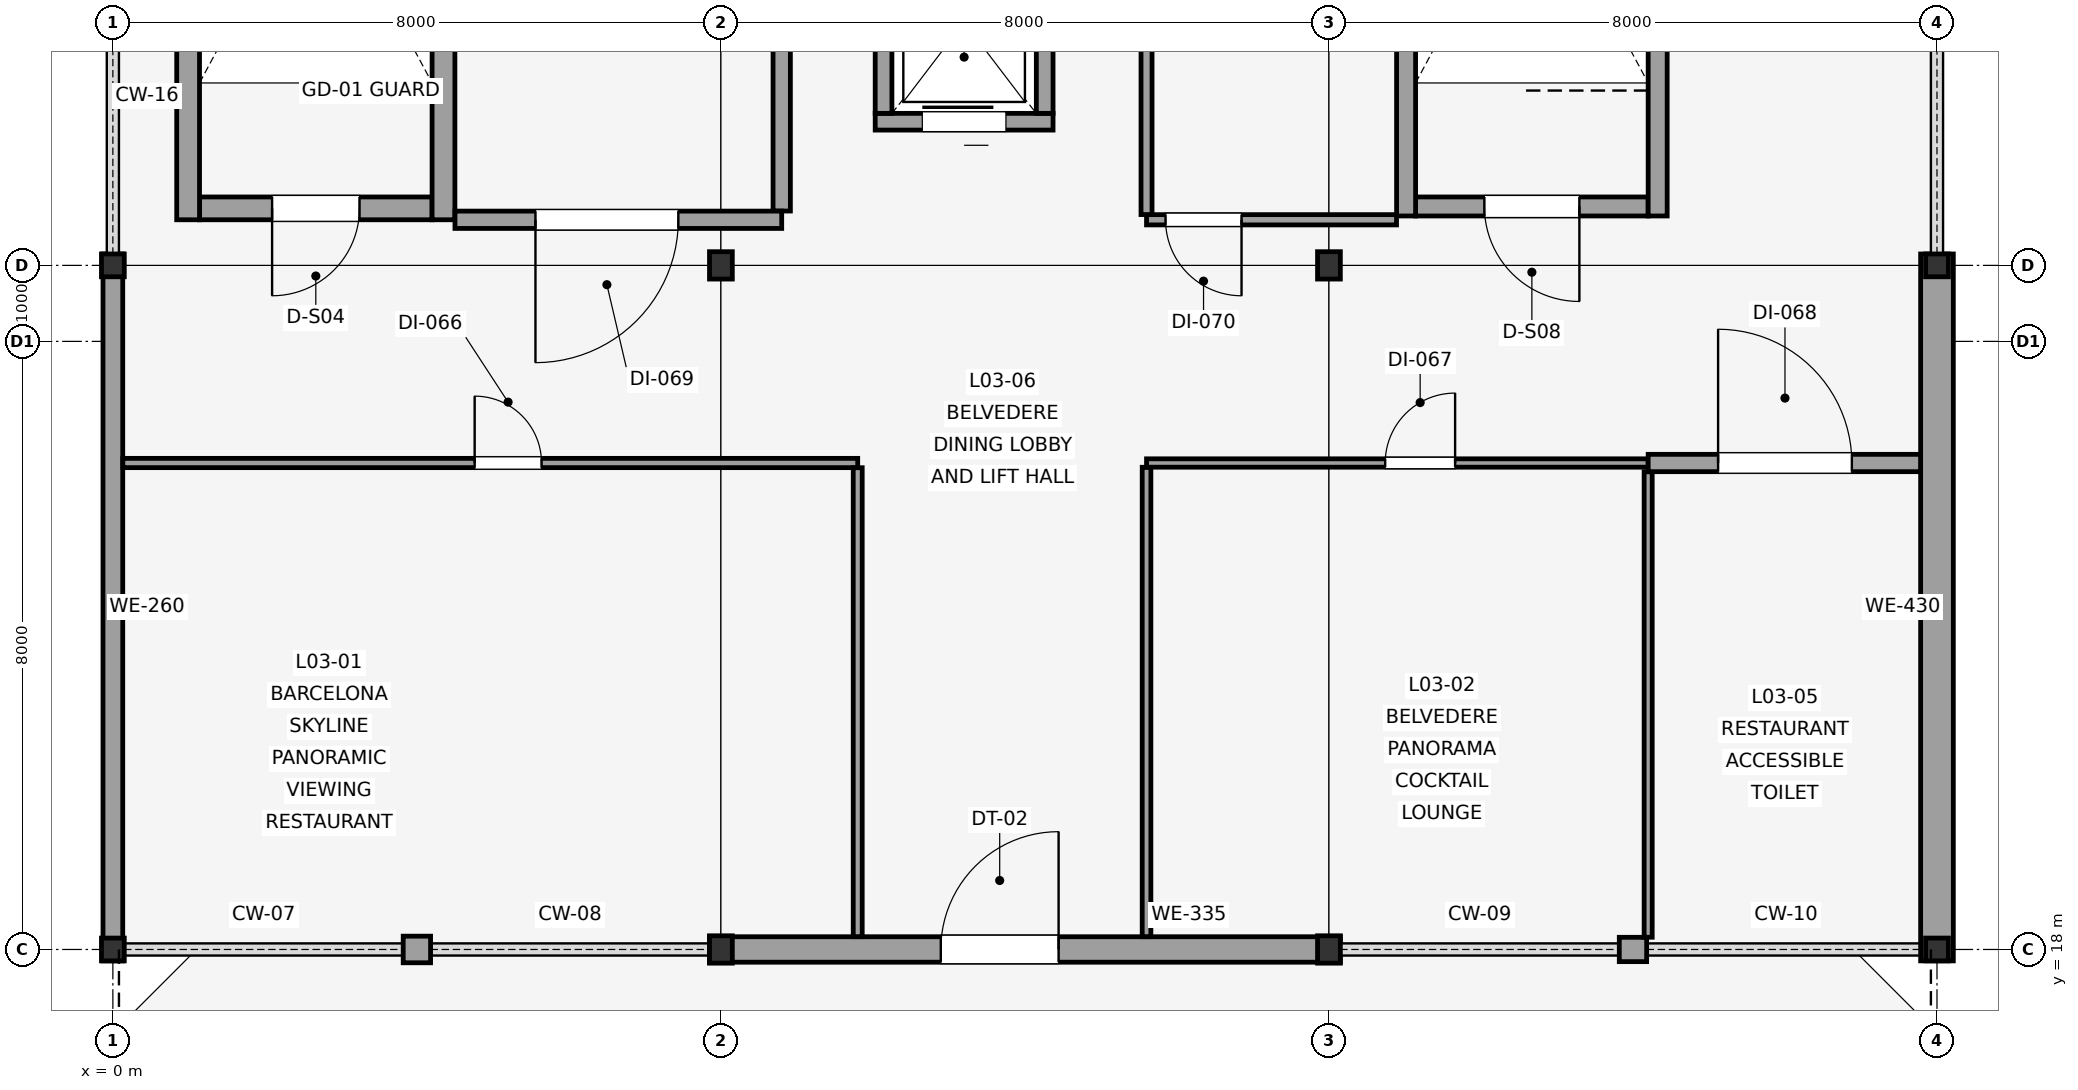
"""IFC4 building model, lengths in metres.
Left out: names, types, materials, properties, quantities, classifications, styles, units other than length and angle.
Written with IfcOpenShell. Run it as: python <this file> out.ifc"""

import sys

from ifc_helpers import new_model, si_unit, direction, frame, frame_2d, origin, origin_2d, place, context, subcontext, project, spatial, rectangle, i_section, extrude, element, fill, save


model = new_model("IFC4")
c1 = context("Model", 3, precision=1e-05, world=origin(), true_north=direction((0.0, 1.0)))
c2 = subcontext(c1, "Body", "Model", "MODEL_VIEW")
j1 = project(units=[si_unit("LENGTHUNIT", "METRE"), si_unit("PLANEANGLEUNIT", "RADIAN")], contexts=[c1])
p1 = place(None, origin())
s1 = spatial("IfcSite", under=j1, at=p1, CompositionType="ELEMENT")
p2 = place(p1, origin())
s2 = spatial("IfcBuilding", under=s1, at=p2, CompositionType="ELEMENT")
p3 = place(p2, frame((0.0, 0.0, 13.8)))
s3 = spatial("IfcBuildingStorey", under=s2, at=p3, CompositionType="ELEMENT", Elevation=13.8)
for number, where, z_axis, x_axis in (
    (1, (0.0, 18.0, 0.0), (0.0, 0.0, 1.0), (1.0, 0.0, 0.0)),
    (2, (0.0, 27.0, 0.0), (0.0, 0.0, 1.0), (1.0, 0.0, 0.0)),
):
    element("IfcColumn", number, at=place(p3, frame(where, z_axis=z_axis, x_axis=x_axis)), inside=s3, PredefinedType="COLUMN", context=c2, shape_type="SweptSolid", body=[
        extrude(i_section(OverallWidth=0.3, OverallDepth=0.3, WebThickness=0.009, FlangeThickness=0.014, FilletRadius=0.027, at=origin_2d()), origin(), (0.0, 0.0, 1.0), 4.5),
    ])
for number, where, z_axis, x_axis in (
    (3, (8.0, 18.0, 0.0), (0.0, 0.0, 1.0), (1.0, 0.0, 0.0)),
    (4, (8.0, 27.0, 0.0), (0.0, 0.0, 1.0), (1.0, 0.0, 0.0)),
    (5, (16.0, 18.0, 0.0), (0.0, 0.0, 1.0), (1.0, 0.0, 0.0)),
    (6, (16.0, 27.0, 0.0), (0.0, 0.0, 1.0), (1.0, 0.0, 0.0)),
):
    element("IfcColumn", number, at=place(p3, frame(where, z_axis=z_axis, x_axis=x_axis)), inside=s3, PredefinedType="COLUMN", context=c2, shape_type="SweptSolid", body=[
        extrude(i_section(OverallWidth=0.3, OverallDepth=0.36, WebThickness=0.01, FlangeThickness=0.018, FilletRadius=0.027, at=origin_2d()), origin(), (0.0, 0.0, 1.0), 4.5),
    ])
for number, where, z_axis, x_axis in (
    (7, (24.0, 18.0, 0.0), (0.0, 0.0, 1.0), (1.0, 0.0, 0.0)),
    (8, (24.0, 27.0, 0.0), (0.0, 0.0, 1.0), (1.0, 0.0, 0.0)),
):
    element("IfcColumn", number, at=place(p3, frame(where, z_axis=z_axis, x_axis=x_axis)), inside=s3, PredefinedType="COLUMN", context=c2, shape_type="SweptSolid", body=[
        extrude(i_section(OverallWidth=0.3, OverallDepth=0.3, WebThickness=0.009, FlangeThickness=0.014, FilletRadius=0.027, at=origin_2d()), origin(), (0.0, 0.0, 1.0), 4.5),
    ])
p4 = place(p3, frame((3.82, 18.0, 0.0), z_axis=(0.0, 0.0, 1.0), x_axis=(1.0, 0.0, 0.0)))
e9 = element("IfcWall", 9, at=p4, inside=s3, PredefinedType="SOLIDWALL", context=c2, shape_type="SweptSolid", body=[
    extrude(rectangle(XDim=0.36, YDim=0.35, at=frame_2d((0.18, 0.0))), origin(), (0.0, 0.0, 1.0), 2.55),
])
p5 = place(p3, frame((7.85, 18.0, 0.0), z_axis=(0.0, 0.0, 1.0), x_axis=(1.0, 0.0, 0.0)))
e10 = element("IfcWall", 10, at=p5, inside=s3, PredefinedType="SOLIDWALL", context=c2, shape_type="SweptSolid", body=[
    extrude(rectangle(XDim=8.3, YDim=0.335, at=frame_2d((4.15, 0.0))), origin(), (0.0, 0.0, 1.0), 2.55),
])
p6 = place(p5, frame((3.043, 0.0, 0.0)))
e11 = element("IfcOpeningElement", 11, at=p6, cuts=e10, PredefinedType="OPENING", context=c2, shape_type="SweptSolid", body=[
    extrude(rectangle(XDim=1.55, YDim=2.3, at=frame_2d((0.775, 1.15))), frame((0.0, 0.177, 0.0), z_axis=(0.0, -1.0, 0.0), x_axis=(1.0, 0.0, 0.0)), (0.0, 0.0, 1.0), 0.355),
])
p7 = place(p3, frame((19.82, 18.0, 0.0), z_axis=(0.0, 0.0, 1.0), x_axis=(1.0, 0.0, 0.0)))
e12 = element("IfcWall", 12, at=p7, inside=s3, PredefinedType="SOLIDWALL", context=c2, shape_type="SweptSolid", body=[
    extrude(rectangle(XDim=0.36, YDim=0.32, at=frame_2d((0.18, 0.0))), origin(), (0.0, 0.0, 1.0), 2.55),
])
p8 = place(p3, frame((0.0, 27.15, 0.0), z_axis=(0.0, 0.0, 1.0), x_axis=(0.0, -1.0, 0.0)))
e13 = element("IfcWall", 13, at=p8, inside=s3, PredefinedType="SOLIDWALL", context=c2, shape_type="SweptSolid", body=[
    extrude(rectangle(XDim=9.3, YDim=0.26, at=frame_2d((4.65, 0.0))), origin(), (0.0, 0.0, 1.0), 2.55),
])
p9 = place(p3, frame((24.0, 17.85, 0.0), z_axis=(0.0, 0.0, 1.0), x_axis=(0.0, 1.0, 0.0)))
e14 = element("IfcWall", 14, at=p9, inside=s3, PredefinedType="SOLIDWALL", context=c2, shape_type="SweptSolid", body=[
    extrude(rectangle(XDim=9.3, YDim=0.43, at=frame_2d((4.65, 0.0))), origin(), (0.0, 0.0, 1.0), 2.55),
])
p10 = place(p3, frame((4.2, 27.75, 0.0), z_axis=(0.0, 0.0, 1.0), x_axis=(-1.0, 0.0, 0.0)))
e15 = element("IfcWall", 15, at=p10, inside=s3, PredefinedType="SHEAR", context=c2, shape_type="SweptSolid", body=[
    extrude(rectangle(XDim=3.06, YDim=0.3, at=frame_2d((1.53, 0.0))), origin(), (0.0, 0.0, 1.0), 4.5),
])
p11 = place(p10, frame((0.955, 0.0, 0.0)))
e16 = element("IfcOpeningElement", 16, at=p11, cuts=e15, PredefinedType="OPENING", context=c2, shape_type="SweptSolid", body=[
    extrude(rectangle(XDim=1.15, YDim=2.15, at=frame_2d((0.575, 1.075))), frame((0.0, 0.16, 0.0), z_axis=(0.0, -1.0, 0.0), x_axis=(1.0, 0.0, 0.0)), (0.0, 0.0, 1.0), 0.32),
])
for number, where, z_axis, x_axis in (
    (17, (4.35, 27.6, 0.0), (0.0, 0.0, 1.0), (0.0, 1.0, 0.0)),
    (18, (0.99, 27.6, 0.0), (0.0, 0.0, 1.0), (0.0, 1.0, 0.0)),
):
    element("IfcWall", number, at=place(p3, frame(where, z_axis=z_axis, x_axis=x_axis)), inside=s3, PredefinedType="SHEAR", context=c2, shape_type="SweptSolid", body=[
        extrude(rectangle(XDim=7.8, YDim=0.3, at=frame_2d((3.9, 0.0))), origin(), (0.0, 0.0, 1.0), 4.5),
    ])
p12 = place(p3, frame((20.2, 27.775, 0.0), z_axis=(0.0, 0.0, 1.0), x_axis=(-1.0, 0.0, 0.0)))
e19 = element("IfcWall", 19, at=p12, inside=s3, PredefinedType="SHEAR", context=c2, shape_type="SweptSolid", body=[
    extrude(rectangle(XDim=3.06, YDim=0.25, at=frame_2d((1.53, 0.0))), origin(), (0.0, 0.0, 1.0), 4.5),
])
p13 = place(p12, frame((0.905, 0.0, 0.0)))
e20 = element("IfcOpeningElement", 20, at=p13, cuts=e19, PredefinedType="OPENING", context=c2, shape_type="SweptSolid", body=[
    extrude(rectangle(XDim=1.25, YDim=2.15, at=frame_2d((0.625, 1.075))), frame((0.0, 0.135, 0.0), z_axis=(0.0, -1.0, 0.0), x_axis=(1.0, 0.0, 0.0)), (0.0, 0.0, 1.0), 0.27),
])
for number, where, z_axis, x_axis in (
    (21, (20.325, 27.65, 0.0), (0.0, 0.0, 1.0), (0.0, 1.0, 0.0)),
    (22, (17.015, 27.65, 0.0), (0.0, 0.0, 1.0), (0.0, 1.0, 0.0)),
):
    element("IfcWall", number, at=place(p3, frame(where, z_axis=z_axis, x_axis=x_axis)), inside=s3, PredefinedType="SHEAR", context=c2, shape_type="SweptSolid", body=[
        extrude(rectangle(XDim=7.7, YDim=0.25, at=frame_2d((3.85, 0.0))), origin(), (0.0, 0.0, 1.0), 4.5),
    ])
p14 = place(p3, frame((10.03, 28.89, 0.0), z_axis=(0.0, 0.0, 1.0), x_axis=(1.0, 0.0, 0.0)))
e23 = element("IfcWall", 23, at=p14, inside=s3, PredefinedType="SHEAR", context=c2, shape_type="SweptSolid", body=[
    extrude(rectangle(XDim=2.34, YDim=0.22, at=frame_2d((1.17, 0.0))), origin(), (0.0, 0.0, 1.0), 4.5),
])
p15 = place(p14, frame((0.62, 0.0, 0.0)))
e24 = element("IfcOpeningElement", 24, at=p15, cuts=e23, PredefinedType="OPENING", context=c2, shape_type="SweptSolid", body=[
    extrude(rectangle(XDim=1.1, YDim=2.15, at=frame_2d((0.55, 1.075))), frame((0.0, 0.12, 0.0), z_axis=(0.0, -1.0, 0.0), x_axis=(1.0, 0.0, 0.0)), (0.0, 0.0, 1.0), 0.24),
])
for number, where, z_axis, x_axis in (
    (25, (10.14, 29.0, 0.0), (0.0, 0.0, 1.0), (0.0, 1.0, 0.0)),
    (26, (12.26, 29.0, 0.0), (0.0, 0.0, 1.0), (0.0, 1.0, 0.0)),
):
    element("IfcWall", number, at=place(p3, frame(where, z_axis=z_axis, x_axis=x_axis)), inside=s3, PredefinedType="SHEAR", context=c2, shape_type="SweptSolid", body=[
        extrude(rectangle(XDim=2.4, YDim=0.22, at=frame_2d((1.2, 0.0))), origin(), (0.0, 0.0, 1.0), 4.5),
    ])
p16 = place(p3, frame((0.131, 24.4, 0.0), z_axis=(0.0, 0.0, 1.0), x_axis=(1.0, 0.0, 0.0)))
e27 = element("IfcWall", 27, at=p16, inside=s3, PredefinedType="PARTITIONING", context=c2, shape_type="SweptSolid", body=[
    extrude(rectangle(XDim=9.669, YDim=0.122, at=frame_2d((4.834, 0.0))), origin(), (0.0, 0.0, 1.0), 2.7),
])
p17 = place(p16, frame((4.629, 0.0, 0.0)))
e28 = element("IfcOpeningElement", 28, at=p17, cuts=e27, PredefinedType="OPENING", context=c2, shape_type="SweptSolid", body=[
    extrude(rectangle(XDim=0.88, YDim=2.1, at=frame_2d((0.44, 1.05))), frame((0.0, 0.071, 0.0), z_axis=(0.0, -1.0, 0.0), x_axis=(1.0, 0.0, 0.0)), (0.0, 0.0, 1.0), 0.142),
])
p18 = place(p3, frame((9.8, 24.338, 0.0), z_axis=(0.0, 0.0, 1.0), x_axis=(0.0, -1.0, 0.0)))
e29 = element("IfcWall", 29, at=p18, inside=s3, PredefinedType="PARTITIONING", context=c2, shape_type="SweptSolid", body=[
    extrude(rectangle(XDim=6.169, YDim=0.118, at=frame_2d((3.085, 0.0))), origin(), (0.0, 0.0, 1.0), 2.7),
])
p19 = place(p3, frame((13.6, 18.168, 0.0), z_axis=(0.0, 0.0, 1.0), x_axis=(0.0, 1.0, 0.0)))
e30 = element("IfcWall", 30, at=p19, inside=s3, PredefinedType="PARTITIONING", context=c2, shape_type="SweptSolid", body=[
    extrude(rectangle(XDim=6.176, YDim=0.114, at=frame_2d((3.088, 0.0))), origin(), (0.0, 0.0, 1.0), 2.7),
])
p20 = place(p3, frame((13.6, 24.4, 0.0), z_axis=(0.0, 0.0, 1.0), x_axis=(1.0, 0.0, 0.0)))
e31 = element("IfcWall", 31, at=p20, inside=s3, PredefinedType="PARTITIONING", context=c2, shape_type="SweptSolid", body=[
    extrude(rectangle(XDim=6.6, YDim=0.11, at=frame_2d((3.3, 0.0))), origin(), (0.0, 0.0, 1.0), 2.7),
])
p21 = place(p20, frame((3.14, 0.0, 0.0)))
e32 = element("IfcOpeningElement", 32, at=p21, cuts=e31, PredefinedType="OPENING", context=c2, shape_type="SweptSolid", body=[
    extrude(rectangle(XDim=0.92, YDim=2.12, at=frame_2d((0.46, 1.06))), frame((0.0, 0.065, 0.0), z_axis=(0.0, -1.0, 0.0), x_axis=(1.0, 0.0, 0.0)), (0.0, 0.0, 1.0), 0.13),
])
p22 = place(p3, frame((20.2, 24.285, 0.0), z_axis=(0.0, 0.0, 1.0), x_axis=(0.0, -1.0, 0.0)))
e33 = element("IfcWall", 33, at=p22, inside=s3, PredefinedType="PARTITIONING", context=c2, shape_type="SweptSolid", body=[
    extrude(rectangle(XDim=6.124, YDim=0.106, at=frame_2d((3.062, 0.0))), origin(), (0.0, 0.0, 1.0), 2.7),
])
p23 = place(p3, frame((20.2, 24.4, 0.0), z_axis=(0.0, 0.0, 1.0), x_axis=(1.0, 0.0, 0.0)))
e34 = element("IfcWall", 34, at=p23, inside=s3, PredefinedType="PLUMBINGWALL", context=c2, shape_type="SweptSolid", body=[
    extrude(rectangle(XDim=3.584, YDim=0.228, at=frame_2d((1.792, 0.0))), origin(), (0.0, 0.0, 1.0), 2.7),
])
p24 = place(p23, frame((0.92, 0.0, 0.0)))
e35 = element("IfcOpeningElement", 35, at=p24, cuts=e34, PredefinedType="OPENING", context=c2, shape_type="SweptSolid", body=[
    extrude(rectangle(XDim=1.76, YDim=2.22, at=frame_2d((0.88, 1.11))), frame((0.0, 0.124, 0.0), z_axis=(0.0, -1.0, 0.0), x_axis=(1.0, 0.0, 0.0)), (0.0, 0.0, 1.0), 0.248),
])
p25 = place(p3, frame((8.8, 35.854, 0.0), z_axis=(0.0, 0.0, 1.0), x_axis=(0.0, -1.0, 0.0)))
e36 = element("IfcWall", 36, at=p25, inside=s3, PredefinedType="PLUMBINGWALL", context=c2, shape_type="SweptSolid", body=[
    extrude(rectangle(XDim=8.139, YDim=0.228, at=frame_2d((4.069, 0.0))), origin(), (0.0, 0.0, 1.0), 2.7),
])
p26 = place(p3, frame((8.8, 27.6, 0.0), z_axis=(0.0, 0.0, 1.0), x_axis=(-1.0, 0.0, 0.0)))
e37 = element("IfcWall", 37, at=p26, inside=s3, PredefinedType="PLUMBINGWALL", context=c2, shape_type="SweptSolid", body=[
    extrude(rectangle(XDim=4.299, YDim=0.228, at=frame_2d((2.149, 0.0))), origin(), (0.0, 0.0, 1.0), 2.7),
])
p27 = place(p26, frame((1.36, 0.0, 0.0)))
e38 = element("IfcOpeningElement", 38, at=p27, cuts=e37, PredefinedType="OPENING", context=c2, shape_type="SweptSolid", body=[
    extrude(rectangle(XDim=1.88, YDim=2.25, at=frame_2d((0.94, 1.125))), frame((0.0, 0.124, 0.0), z_axis=(0.0, -1.0, 0.0), x_axis=(1.0, 0.0, 0.0)), (0.0, 0.0, 1.0), 0.248),
])
p28 = place(p3, frame((16.889, 27.6, 0.0), z_axis=(0.0, 0.0, 1.0), x_axis=(-1.0, 0.0, 0.0)))
e39 = element("IfcWall", 39, at=p28, inside=s3, PredefinedType="PARTITIONING", context=c2, shape_type="SweptSolid", body=[
    extrude(rectangle(XDim=3.289, YDim=0.135, at=frame_2d((1.645, 0.0))), origin(), (0.0, 0.0, 1.0), 2.7),
])
p29 = place(p28, frame((2.039, 0.0, 0.0)))
e40 = element("IfcOpeningElement", 40, at=p29, cuts=e39, PredefinedType="OPENING", context=c2, shape_type="SweptSolid", body=[
    extrude(rectangle(XDim=1.0, YDim=2.15, at=frame_2d((0.5, 1.075))), frame((0.0, 0.077, 0.0), z_axis=(0.0, -1.0, 0.0), x_axis=(1.0, 0.0, 0.0)), (0.0, 0.0, 1.0), 0.155),
])
p30 = place(p3, frame((13.6, 27.668, 0.0), z_axis=(0.0, 0.0, 1.0), x_axis=(0.0, 1.0, 0.0)))
e41 = element("IfcWall", 41, at=p30, inside=s3, PredefinedType="PARTITIONING", context=c2, shape_type="SweptSolid", body=[
    extrude(rectangle(XDim=8.186, YDim=0.145, at=frame_2d((4.093, 0.0))), origin(), (0.0, 0.0, 1.0), 2.7),
])
p31 = place(p6, origin())
e42 = element("IfcDoor", 42, at=p31, inside=s3, OperationType="DOUBLE_SWING_RIGHT", PredefinedType="DOOR", context=c2, shape_type="SweptSolid", body=[
    extrude(rectangle(XDim=1.55, YDim=2.3, at=frame_2d((0.775, 1.15))), frame((0.0, 0.025, 0.0), z_axis=(0.0, -1.0, 0.0), x_axis=(1.0, 0.0, 0.0)), (0.0, 0.0, 1.0), 0.05),
])
fill(e11, e42)
p32 = place(p11, origin())
e43 = element("IfcDoor", 43, at=p32, inside=s3, OperationType="SINGLE_SWING_RIGHT", PredefinedType="DOOR", context=c2, shape_type="SweptSolid", body=[
    extrude(rectangle(XDim=1.15, YDim=2.15, at=frame_2d((0.575, 1.075))), frame((0.0, 0.025, 0.0), z_axis=(0.0, -1.0, 0.0), x_axis=(1.0, 0.0, 0.0)), (0.0, 0.0, 1.0), 0.05),
])
fill(e16, e43)
p33 = place(p13, origin())
e44 = element("IfcDoor", 44, at=p33, inside=s3, OperationType="SINGLE_SWING_LEFT", PredefinedType="DOOR", context=c2, shape_type="SweptSolid", body=[
    extrude(rectangle(XDim=1.25, YDim=2.15, at=frame_2d((0.625, 1.075))), frame((0.0, 0.025, 0.0), z_axis=(0.0, -1.0, 0.0), x_axis=(1.0, 0.0, 0.0)), (0.0, 0.0, 1.0), 0.05),
])
fill(e20, e44)
p34 = place(p15, origin())
e45 = element("IfcDoor", 45, at=p34, inside=s3, OperationType="SLIDING_TO_LEFT", PredefinedType="DOOR", context=c2, shape_type="SweptSolid", body=[
    extrude(rectangle(XDim=1.1, YDim=2.15, at=frame_2d((0.55, 1.075))), frame((0.0, 0.025, 0.0), z_axis=(0.0, -1.0, 0.0), x_axis=(1.0, 0.0, 0.0)), (0.0, 0.0, 1.0), 0.05),
])
fill(e24, e45)
p35 = place(p17, origin())
e46 = element("IfcDoor", 46, at=p35, inside=s3, OperationType="SINGLE_SWING_LEFT", PredefinedType="DOOR", context=c2, shape_type="SweptSolid", body=[
    extrude(rectangle(XDim=0.88, YDim=2.1, at=frame_2d((0.44, 1.05))), frame((0.0, 0.025, 0.0), z_axis=(0.0, -1.0, 0.0), x_axis=(1.0, 0.0, 0.0)), (0.0, 0.0, 1.0), 0.05),
])
fill(e28, e46)
p36 = place(p21, origin())
e47 = element("IfcDoor", 47, at=p36, inside=s3, OperationType="SINGLE_SWING_RIGHT", PredefinedType="DOOR", context=c2, shape_type="SweptSolid", body=[
    extrude(rectangle(XDim=0.92, YDim=2.12, at=frame_2d((0.46, 1.06))), frame((0.0, 0.025, 0.0), z_axis=(0.0, -1.0, 0.0), x_axis=(1.0, 0.0, 0.0)), (0.0, 0.0, 1.0), 0.05),
])
fill(e32, e47)
p37 = place(p24, origin())
e48 = element("IfcDoor", 48, at=p37, inside=s3, OperationType="SINGLE_SWING_LEFT", PredefinedType="DOOR", context=c2, shape_type="SweptSolid", body=[
    extrude(rectangle(XDim=1.76, YDim=2.22, at=frame_2d((0.88, 1.11))), frame((0.0, 0.025, 0.0), z_axis=(0.0, -1.0, 0.0), x_axis=(1.0, 0.0, 0.0)), (0.0, 0.0, 1.0), 0.05),
])
fill(e35, e48)
p38 = place(p27, origin())
e49 = element("IfcDoor", 49, at=p38, inside=s3, OperationType="SINGLE_SWING_RIGHT", PredefinedType="DOOR", context=c2, shape_type="SweptSolid", body=[
    extrude(rectangle(XDim=1.88, YDim=2.25, at=frame_2d((0.94, 1.125))), frame((0.0, 0.025, 0.0), z_axis=(0.0, -1.0, 0.0), x_axis=(1.0, 0.0, 0.0)), (0.0, 0.0, 1.0), 0.05),
])
fill(e38, e49)
p39 = place(p29, origin())
e50 = element("IfcDoor", 50, at=p39, inside=s3, OperationType="SINGLE_SWING_LEFT", PredefinedType="DOOR", context=c2, shape_type="SweptSolid", body=[
    extrude(rectangle(XDim=1.0, YDim=2.15, at=frame_2d((0.5, 1.075))), frame((0.0, 0.025, 0.0), z_axis=(0.0, -1.0, 0.0), x_axis=(1.0, 0.0, 0.0)), (0.0, 0.0, 1.0), 0.05),
])
fill(e40, e50)
save(model, sys.argv[1])
